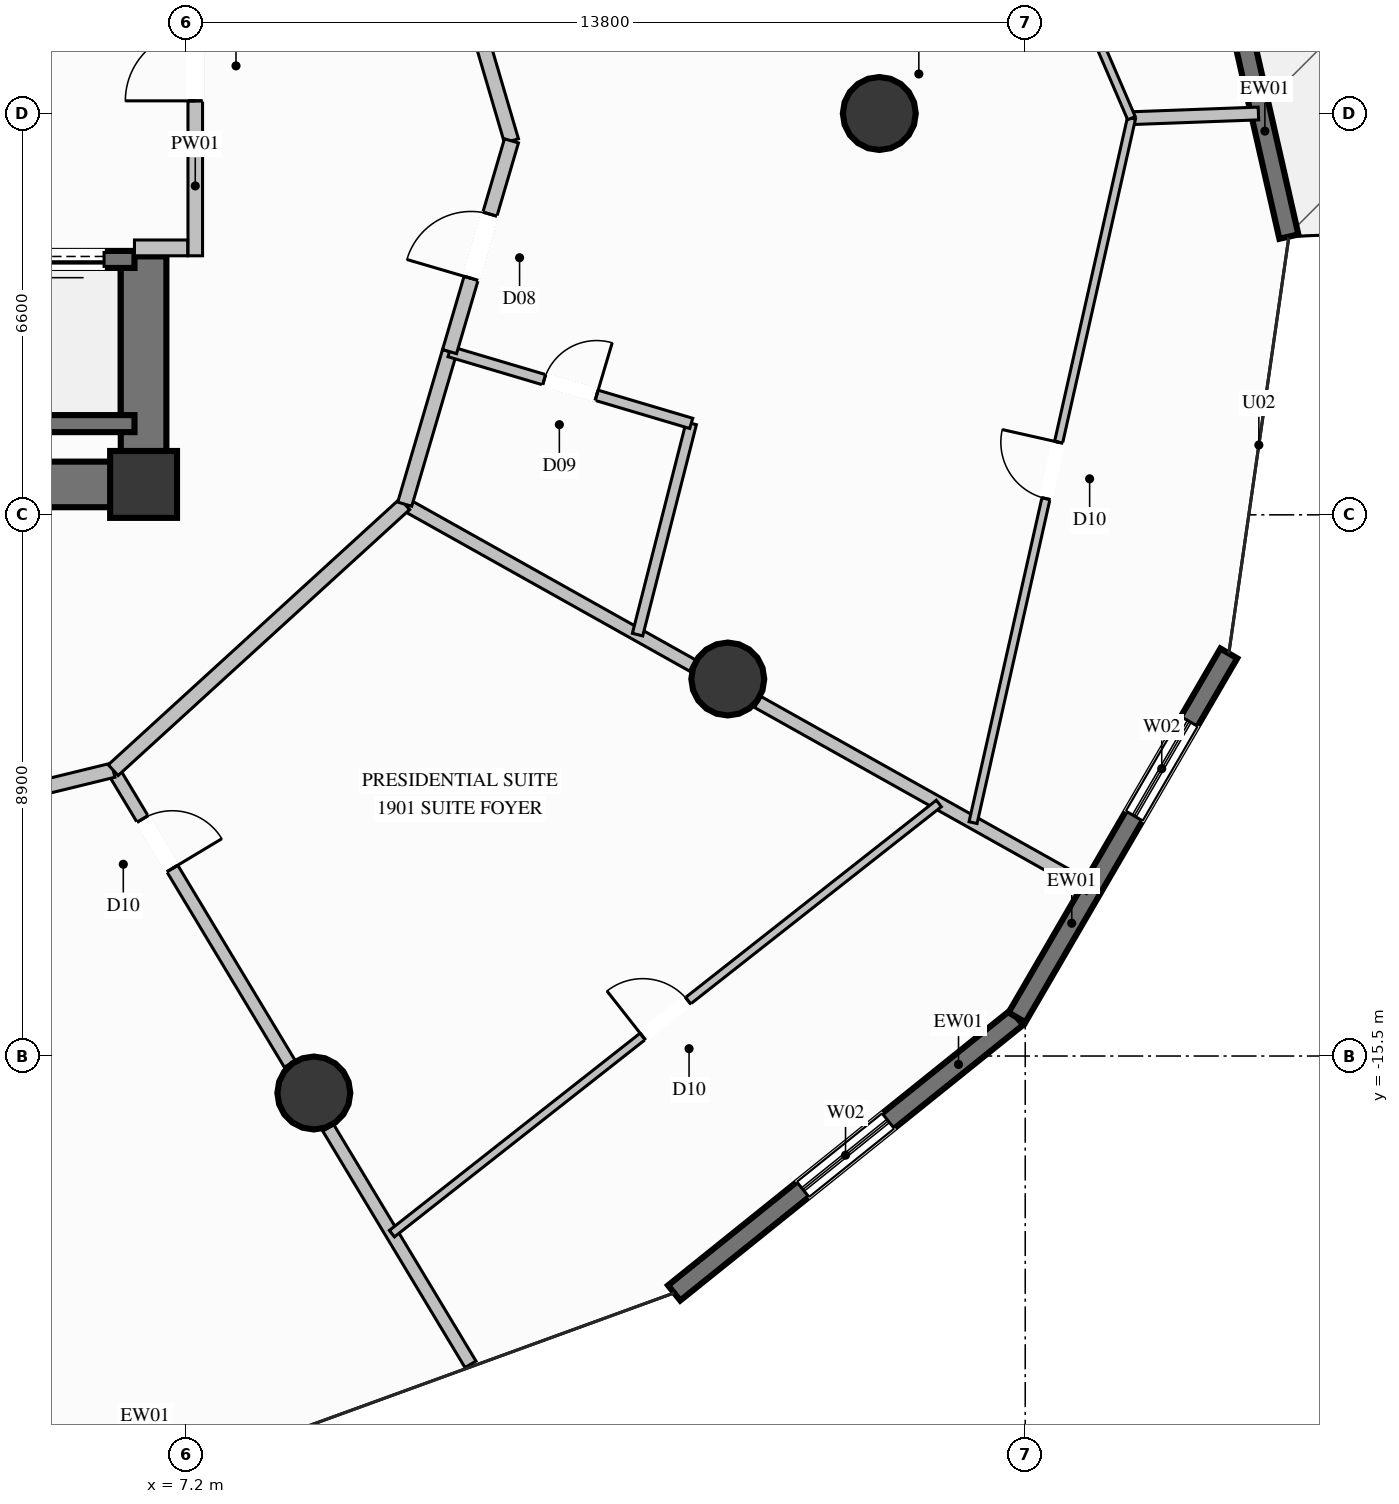
"""IFC4 building model, lengths in metres.
Left out: names, types, materials, properties, quantities, classifications, styles, units other than length and angle.
Written with IfcOpenShell. Run it as: python <this file> out.ifc"""

import sys

from ifc_helpers import new_model, si_unit, direction, frame, frame_2d, origin, origin_2d, place, context, subcontext, project, spatial, rectangle, circle, extrude, element, fill, save


model = new_model("IFC4")
c1 = context("Model", 3, precision=1e-05, world=origin(), true_north=direction((0.0, 1.0)))
c2 = subcontext(c1, "Body", "Model", "MODEL_VIEW")
j1 = project(units=[si_unit("LENGTHUNIT", "METRE"), si_unit("PLANEANGLEUNIT", "RADIAN")], contexts=[c1])
p1 = place(None, origin())
s1 = spatial("IfcSite", under=j1, at=p1, CompositionType="ELEMENT")
p2 = place(p1, origin())
s2 = spatial("IfcBuilding", under=s1, at=p2, CompositionType="ELEMENT")
p3 = place(p2, frame((0.0, 0.0, 71.6)))
s3 = spatial("IfcBuildingStorey", under=s2, at=p3, CompositionType="ELEMENT", Elevation=71.6)
p4 = place(p3, frame((6.5, -6.1, 0.0), z_axis=(0.0, 0.0, 1.0), x_axis=(1.0, 0.0, 0.0)))
e1 = element("IfcColumn", 1, at=p4, inside=s3, PredefinedType="COLUMN", context=c2, shape_type="SweptSolid", body=[
    extrude(rectangle(XDim=1.1, YDim=1.1, at=origin_2d()), origin(), (0.0, 0.0, 1.0), 3.6),
])
p5 = place(p3, frame((4.15, -6.1, 0.0), z_axis=(0.0, 0.0, 1.0), x_axis=(1.0, 0.0, 0.0)))
e2 = element("IfcWall", 2, at=p5, inside=s3, PredefinedType="SHEAR", context=c2, shape_type="SweptSolid", body=[
    extrude(rectangle(XDim=1.975, YDim=0.75, at=frame_2d((0.988, 0.0))), origin(), (0.0, 0.0, 1.0), 3.6),
])
p6 = place(p3, frame((6.5, -6.475, 0.0), z_axis=(0.0, 0.0, 1.0), x_axis=(0.0, 1.0, 0.0)))
e3 = element("IfcWall", 3, at=p6, inside=s3, PredefinedType="SHEAR", context=c2, shape_type="SweptSolid", body=[
    extrude(rectangle(XDim=4.125, YDim=0.75, at=frame_2d((2.062, 0.0))), origin(), (0.0, 0.0, 1.0), 3.6),
])
for number, where, z_axis, x_axis in (
    (4, (18.6, 0.0, 0.0), (0.0, 0.0, 1.0), (1.0, 0.0, 0.0)),
    (5, (9.3, -16.108, 0.0), (0.0, 0.0, 1.0), (1.0, 0.0, 0.0)),
    (6, (16.108, -9.3, 0.0), (0.0, 0.0, 1.0), (1.0, 0.0, 0.0)),
):
    element("IfcColumn", number, at=place(p3, frame(where, z_axis=z_axis, x_axis=x_axis)), inside=s3, PredefinedType="COLUMN", context=c2, shape_type="SweptSolid", body=[
        extrude(circle(Radius=0.6, at=origin_2d()), origin(), (0.0, 0.0, 1.0), 3.6),
    ])
p7 = place(p3, frame((23.731, 5.028, 0.0), z_axis=(0.0, 0.0, 1.0), x_axis=(0.221888063911, -0.975072144558, 0.0)))
e7 = element("IfcWall", 7, at=p7, inside=s3, PredefinedType="SOLIDWALL", context=c2, shape_type="SweptSolid", body=[
    extrude(rectangle(XDim=7.233, YDim=0.32, at=frame_2d((3.617, 0.0))), origin(), (0.0, 0.0, 1.0), 3.34),
])
p8 = place(p7, frame((1.624, 0.0, 0.35)))
e8 = element("IfcOpeningElement", 8, at=p8, cuts=e7, PredefinedType="OPENING", context=c2, shape_type="SweptSolid", body=[
    extrude(rectangle(XDim=1.8, YDim=2.6, at=frame_2d((0.9, 1.3))), frame((0.0, 0.17, 0.0), z_axis=(0.0, -1.0, 0.0), x_axis=(1.0, 0.0, 0.0)), (0.0, 0.0, 1.0), 0.34),
])
p9 = place(p3, frame((20.864, -14.865, 0.0), z_axis=(0.0, 0.0, 1.0), x_axis=(-0.779473911099, -0.626434690862, 0.0)))
e9 = element("IfcWall", 9, at=p9, inside=s3, PredefinedType="SOLIDWALL", context=c2, shape_type="SweptSolid", body=[
    extrude(rectangle(XDim=7.233, YDim=0.32, at=frame_2d((3.616, 0.0))), origin(), (0.0, 0.0, 1.0), 3.34),
])
p10 = place(p9, frame((2.717, 0.0, 0.35)))
e10 = element("IfcOpeningElement", 10, at=p10, cuts=e9, PredefinedType="OPENING", context=c2, shape_type="SweptSolid", body=[
    extrude(rectangle(XDim=1.8, YDim=2.6, at=frame_2d((0.9, 1.3))), frame((0.0, 0.17, 0.0), z_axis=(0.0, -1.0, 0.0), x_axis=(1.0, 0.0, 0.0)), (0.0, 0.0, 1.0), 0.34),
])
p11 = place(p3, frame((24.348, -8.879, 0.0), z_axis=(0.0, 0.0, 1.0), x_axis=(-0.503009446837, -0.864280912894, 0.0)))
e11 = element("IfcWall", 11, at=p11, inside=s3, PredefinedType="SOLIDWALL", context=c2, shape_type="SweptSolid", body=[
    extrude(rectangle(XDim=6.926, YDim=0.32, at=frame_2d((3.463, 0.0))), origin(), (0.0, 0.0, 1.0), 3.34),
])
p12 = place(p11, frame((1.293, 0.0, 0.35)))
e12 = element("IfcOpeningElement", 12, at=p12, cuts=e11, PredefinedType="OPENING", context=c2, shape_type="SweptSolid", body=[
    extrude(rectangle(XDim=1.8, YDim=2.6, at=frame_2d((0.9, 1.3))), frame((0.0, 0.17, 0.0), z_axis=(0.0, -1.0, 0.0), x_axis=(1.0, 0.0, 0.0)), (0.0, 0.0, 1.0), 0.34),
])
p13 = place(p3, frame((4.15, -5.1, 0.0), z_axis=(0.0, 0.0, 1.0), x_axis=(1.0, 0.0, 0.0)))
e13 = element("IfcWall", 13, at=p13, inside=s3, PredefinedType="SOLIDWALL", context=c2, shape_type="SweptSolid", body=[
    extrude(rectangle(XDim=2.2, YDim=0.28, at=frame_2d((1.1, 0.0))), origin(), (0.0, 0.0, 1.0), 3.34),
])
p14 = place(p3, frame((6.35, -2.4, 0.0), z_axis=(0.0, 0.0, 1.0), x_axis=(-1.0, 0.0, 0.0)))
e14 = element("IfcWall", 14, at=p14, inside=s3, PredefinedType="SOLIDWALL", context=c2, shape_type="SweptSolid", body=[
    extrude(rectangle(XDim=2.2, YDim=0.28, at=frame_2d((1.1, 0.0))), origin(), (0.0, 0.0, 1.0), 3.34),
])
p15 = place(p14, frame((0.5, 0.0, 0.0)))
e15 = element("IfcOpeningElement", 15, at=p15, cuts=e14, PredefinedType="OPENING", context=c2, shape_type="SweptSolid", body=[
    extrude(rectangle(XDim=1.2, YDim=2.2, at=frame_2d((0.6, 1.1))), frame((0.0, 0.15, 0.0), z_axis=(0.0, -1.0, 0.0), x_axis=(1.0, 0.0, 0.0)), (0.0, 0.0, 1.0), 0.3),
])
p16 = place(p3, frame((7.35, -2.34, 0.0), z_axis=(0.0, 0.0, 1.0), x_axis=(0.0, 1.0, 0.0)))
e16 = element("IfcWall", 16, at=p16, inside=s3, PredefinedType="PARTITIONING", context=c2, shape_type="SweptSolid", body=[
    extrude(rectangle(XDim=5.07, YDim=0.24, at=frame_2d((2.535, 0.0))), origin(), (0.0, 0.0, 1.0), 2.425),
])
p17 = place(p16, frame((2.548, 0.0, 0.0)))
e17 = element("IfcOpeningElement", 17, at=p17, cuts=e16, PredefinedType="OPENING", context=c2, shape_type="SweptSolid", body=[
    extrude(rectangle(XDim=1.15, YDim=2.2, at=frame_2d((0.575, 1.1))), frame((0.0, 0.13, 0.0), z_axis=(0.0, -1.0, 0.0), x_axis=(1.0, 0.0, 0.0)), (0.0, 0.0, 1.0), 0.26),
])
p18 = place(p3, frame((6.35, -2.21, 0.0), z_axis=(0.0, 0.0, 1.0), x_axis=(1.0, 0.0, 0.0)))
e18 = element("IfcWall", 18, at=p18, inside=s3, PredefinedType="PARTITIONING", context=c2, shape_type="SweptSolid", body=[
    extrude(rectangle(XDim=0.875, YDim=0.26, at=frame_2d((0.438, 0.0))), origin(), (0.0, 0.0, 1.0), 3.34),
])
p19 = place(p3, frame((6.0, -10.799, 0.0), z_axis=(0.0, 0.0, 1.0), x_axis=(0.515348967782, -0.856980420666, 0.0)))
e19 = element("IfcWall", 19, at=p19, inside=s3, PredefinedType="PARTITIONING", context=c2, shape_type="SweptSolid", body=[
    extrude(rectangle(XDim=5.637, YDim=0.21, at=frame_2d((2.818, 0.0))), origin(), (0.0, 0.0, 1.0), 2.709),
])
p20 = place(p19, frame((0.937, 0.0, 0.0)))
e20 = element("IfcOpeningElement", 20, at=p20, cuts=e19, PredefinedType="OPENING", context=c2, shape_type="SweptSolid", body=[
    extrude(rectangle(XDim=0.95, YDim=2.1, at=frame_2d((0.475, 1.05))), frame((0.0, 0.115, 0.0), z_axis=(0.0, -1.0, 0.0), x_axis=(1.0, 0.0, 0.0)), (0.0, 0.0, 1.0), 0.23),
])
p21 = place(p3, frame((9.537, -16.681, 0.0), z_axis=(0.0, 0.0, 1.0), x_axis=(0.515428694024, -0.856932471888, 0.0)))
e21 = element("IfcWall", 21, at=p21, inside=s3, PredefinedType="PARTITIONING", context=c2, shape_type="SweptSolid", body=[
    extrude(rectangle(XDim=4.54, YDim=0.21, at=frame_2d((2.27, 0.0))), origin(), (0.0, 0.0, 1.0), 3.34),
])
p22 = place(p3, frame((10.795, -6.425, 0.0), z_axis=(0.0, 0.0, 1.0), x_axis=(0.8723709625, -0.488844457662, 0.0)))
e22 = element("IfcWall", 22, at=p22, inside=s3, PredefinedType="PARTITIONING", context=c2, shape_type="SweptSolid", body=[
    extrude(rectangle(XDim=5.427, YDim=0.21, at=frame_2d((2.713, 0.0))), origin(), (0.0, 0.0, 1.0), 2.709),
])
p23 = place(p3, frame((16.6, -9.677, 0.0), z_axis=(0.0, 0.0, 1.0), x_axis=(0.872348901989, -0.488883823825, 0.0)))
e23 = element("IfcWall", 23, at=p23, inside=s3, PredefinedType="PARTITIONING", context=c2, shape_type="SweptSolid", body=[
    extrude(rectangle(XDim=6.255, YDim=0.21, at=frame_2d((3.128, 0.0))), origin(), (0.0, 0.0, 1.0), 3.34),
])
p24 = place(p3, frame((-0.55, -12.4, 0.0), z_axis=(0.0, 0.0, 1.0), x_axis=(0.971409027631, 0.237412091177, 0.0)))
e24 = element("IfcWall", 24, at=p24, inside=s3, PredefinedType="PARTITIONING", context=c2, shape_type="SweptSolid", body=[
    extrude(rectangle(XDim=6.743, YDim=0.24, at=frame_2d((3.372, 0.0))), origin(), (0.0, 0.0, 1.0), 2.917),
])
p25 = place(p3, frame((6.0, -10.799, 0.0), z_axis=(0.0, 0.0, 1.0), x_axis=(0.73878836807, 0.673937495028, 0.0)))
e25 = element("IfcWall", 25, at=p25, inside=s3, PredefinedType="PARTITIONING", context=c2, shape_type="SweptSolid", body=[
    extrude(rectangle(XDim=6.49, YDim=0.24, at=frame_2d((3.245, 0.0))), origin(), (0.0, 0.0, 1.0), 3.34),
])
p26 = place(p3, frame((10.584, -18.421, 0.0), z_axis=(0.0, 0.0, 1.0), x_axis=(0.78604730867, 0.618166343739, 0.0)))
e26 = element("IfcWall", 26, at=p26, inside=s3, PredefinedType="PARTITIONING", context=c2, shape_type="SweptSolid", body=[
    extrude(rectangle(XDim=11.443, YDim=0.135, at=frame_2d((5.722, 0.0))), origin(), (0.0, 0.0, 1.0), 3.34),
])
p27 = place(p26, frame((5.247, 0.0, 0.0)))
e27 = element("IfcOpeningElement", 27, at=p27, cuts=e26, PredefinedType="OPENING", context=c2, shape_type="SweptSolid", body=[
    extrude(rectangle(XDim=0.95, YDim=2.1, at=frame_2d((0.475, 1.05))), frame((0.0, 0.078, 0.0), z_axis=(0.0, -1.0, 0.0), x_axis=(1.0, 0.0, 0.0)), (0.0, 0.0, 1.0), 0.155),
])
p28 = place(p3, frame((10.795, -6.425, 0.0), z_axis=(0.0, 0.0, 1.0), x_axis=(0.281852929568, 0.959457620791, 0.0)))
e28 = element("IfcWall", 28, at=p28, inside=s3, PredefinedType="PARTITIONING", context=c2, shape_type="SweptSolid", body=[
    extrude(rectangle(XDim=2.615, YDim=0.24, at=frame_2d((1.308, 0.0))), origin(), (0.0, 0.0, 1.0), 3.34),
])
p29 = place(p3, frame((14.624, -8.57, 0.0), z_axis=(0.0, 0.0, 1.0), x_axis=(0.246347816962, 0.969181486141, 0.0)))
e29 = element("IfcWall", 29, at=p29, inside=s3, PredefinedType="PLUMBINGWALL", context=c2, shape_type="SweptSolid", body=[
    extrude(rectangle(XDim=3.584, YDim=0.175, at=frame_2d((1.792, 0.0))), origin(), (0.0, 0.0, 1.0), 3.34),
])
p30 = place(p3, frame((11.532, -3.916, 0.0), z_axis=(0.0, 0.0, 1.0), x_axis=(0.958658411313, -0.284559396995, 0.0)))
e30 = element("IfcWall", 30, at=p30, inside=s3, PredefinedType="PLUMBINGWALL", context=c2, shape_type="SweptSolid", body=[
    extrude(rectangle(XDim=4.146, YDim=0.175, at=frame_2d((2.073, 0.0))), origin(), (0.0, 0.0, 1.0), 3.34),
])
p31 = place(p30, frame((1.623, 0.0, 0.0)))
e31 = element("IfcOpeningElement", 31, at=p31, cuts=e30, PredefinedType="OPENING", context=c2, shape_type="SweptSolid", body=[
    extrude(rectangle(XDim=0.9, YDim=2.1, at=frame_2d((0.45, 1.05))), frame((0.0, 0.098, 0.0), z_axis=(0.0, -1.0, 0.0), x_axis=(1.0, 0.0, 0.0)), (0.0, 0.0, 1.0), 0.195),
])
p32 = place(p3, frame((22.747, -0.077, 0.0), z_axis=(0.0, 0.0, 1.0), x_axis=(0.9993223365, 0.036808528531, 0.0)))
e32 = element("IfcWall", 32, at=p32, inside=s3, PredefinedType="PARTITIONING", context=c2, shape_type="SweptSolid", body=[
    extrude(rectangle(XDim=2.089, YDim=0.21, at=frame_2d((1.045, 0.0))), origin(), (0.0, 0.0, 1.0), 3.34),
])
p33 = place(p3, frame((12.55, -0.45, 0.0), z_axis=(0.0, 0.0, 1.0), x_axis=(-0.281843679574, 0.959460338046, 0.0)))
e33 = element("IfcWall", 33, at=p33, inside=s3, PredefinedType="PARTITIONING", context=c2, shape_type="SweptSolid", body=[
    extrude(rectangle(XDim=6.227, YDim=0.24, at=frame_2d((3.114, 0.0))), origin(), (0.0, 0.0, 1.0), 2.917),
])
p34 = place(p3, frame((11.532, -3.916, 0.0), z_axis=(0.0, 0.0, 1.0), x_axis=(0.281818707972, 0.959467673159, 0.0)))
e34 = element("IfcWall", 34, at=p34, inside=s3, PredefinedType="PARTITIONING", context=c2, shape_type="SweptSolid", body=[
    extrude(rectangle(XDim=3.613, YDim=0.24, at=frame_2d((1.806, 0.0))), origin(), (0.0, 0.0, 1.0), 2.917),
])
p35 = place(p34, frame((1.256, 0.0, 0.0)))
e35 = element("IfcOpeningElement", 35, at=p35, cuts=e34, PredefinedType="OPENING", context=c2, shape_type="SweptSolid", body=[
    extrude(rectangle(XDim=1.1, YDim=2.3, at=frame_2d((0.55, 1.15))), frame((0.0, 0.13, 0.0), z_axis=(0.0, -1.0, 0.0), x_axis=(1.0, 0.0, 0.0)), (0.0, 0.0, 1.0), 0.26),
])
p36 = place(p3, frame((20.142, -11.662, 0.0), z_axis=(0.0, 0.0, 1.0), x_axis=(0.219376674663, 0.975640238312, 0.0)))
e36 = element("IfcWall", 36, at=p36, inside=s3, PredefinedType="PARTITIONING", context=c2, shape_type="SweptSolid", body=[
    extrude(rectangle(XDim=11.875, YDim=0.135, at=frame_2d((5.937, 0.0))), origin(), (0.0, 0.0, 1.0), 3.34),
])
p37 = place(p36, frame((5.462, 0.0, 0.0)))
e37 = element("IfcOpeningElement", 37, at=p37, cuts=e36, PredefinedType="OPENING", context=c2, shape_type="SweptSolid", body=[
    extrude(rectangle(XDim=0.95, YDim=2.1, at=frame_2d((0.475, 1.05))), frame((0.0, 0.078, 0.0), z_axis=(0.0, -1.0, 0.0), x_axis=(1.0, 0.0, 0.0)), (0.0, 0.0, 1.0), 0.155),
])
p38 = place(p3, frame((22.747, -0.077, 0.0), z_axis=(0.0, 0.0, 1.0), x_axis=(-0.395508976522, 0.918462111081, 0.0)))
e38 = element("IfcWall", 38, at=p38, inside=s3, PredefinedType="PARTITIONING", context=c2, shape_type="SweptSolid", body=[
    extrude(rectangle(XDim=11.414, YDim=0.135, at=frame_2d((5.707, 0.0))), origin(), (0.0, 0.0, 1.0), 3.34),
])
p39 = place(p38, frame((5.232, 0.0, 0.0)))
e39 = element("IfcOpeningElement", 39, at=p39, cuts=e38, PredefinedType="OPENING", context=c2, shape_type="SweptSolid", body=[
    extrude(rectangle(XDim=0.95, YDim=2.1, at=frame_2d((0.475, 1.05))), frame((0.0, 0.078, 0.0), z_axis=(0.0, -1.0, 0.0), x_axis=(1.0, 0.0, 0.0)), (0.0, 0.0, 1.0), 0.155),
])
p40 = place(p10, origin())
e40 = element("IfcWindow", 40, at=p40, inside=s3, PartitioningType="SINGLE_PANEL", PredefinedType="WINDOW", context=c2, shape_type="SweptSolid", body=[
    extrude(rectangle(XDim=1.8, YDim=2.6, at=frame_2d((0.9, 1.3))), frame((0.0, 0.03, 0.0), z_axis=(0.0, -1.0, 0.0), x_axis=(1.0, 0.0, 0.0)), (0.0, 0.0, 1.0), 0.06),
])
fill(e10, e40)
p41 = place(p12, origin())
e41 = element("IfcWindow", 41, at=p41, inside=s3, PartitioningType="SINGLE_PANEL", PredefinedType="WINDOW", context=c2, shape_type="SweptSolid", body=[
    extrude(rectangle(XDim=1.8, YDim=2.6, at=frame_2d((0.9, 1.3))), frame((0.0, 0.03, 0.0), z_axis=(0.0, -1.0, 0.0), x_axis=(1.0, 0.0, 0.0)), (0.0, 0.0, 1.0), 0.06),
])
fill(e12, e41)
p42 = place(p15, origin())
e42 = element("IfcDoor", 42, at=p42, inside=s3, OperationType="SLIDING_TO_LEFT", PredefinedType="DOOR", context=c2, shape_type="SweptSolid", body=[
    extrude(rectangle(XDim=1.2, YDim=2.2, at=frame_2d((0.6, 1.1))), frame((0.0, 0.025, 0.0), z_axis=(0.0, -1.0, 0.0), x_axis=(1.0, 0.0, 0.0)), (0.0, 0.0, 1.0), 0.05),
])
fill(e15, e42)
p43 = place(p17, origin())
e43 = element("IfcDoor", 43, at=p43, inside=s3, OperationType="SINGLE_SWING_LEFT", PredefinedType="DOOR", context=c2, shape_type="SweptSolid", body=[
    extrude(rectangle(XDim=1.15, YDim=2.2, at=frame_2d((0.575, 1.1))), frame((0.0, 0.025, 0.0), z_axis=(0.0, -1.0, 0.0), x_axis=(1.0, 0.0, 0.0)), (0.0, 0.0, 1.0), 0.05),
])
fill(e17, e43)
p44 = place(p20, origin())
e44 = element("IfcDoor", 44, at=p44, inside=s3, OperationType="SINGLE_SWING_RIGHT", PredefinedType="DOOR", context=c2, shape_type="SweptSolid", body=[
    extrude(rectangle(XDim=0.95, YDim=2.1, at=frame_2d((0.475, 1.05))), frame((0.0, 0.025, 0.0), z_axis=(0.0, -1.0, 0.0), x_axis=(1.0, 0.0, 0.0)), (0.0, 0.0, 1.0), 0.05),
])
fill(e20, e44)
p45 = place(p27, origin())
e45 = element("IfcDoor", 45, at=p45, inside=s3, OperationType="SINGLE_SWING_LEFT", PredefinedType="DOOR", context=c2, shape_type="SweptSolid", body=[
    extrude(rectangle(XDim=0.95, YDim=2.1, at=frame_2d((0.475, 1.05))), frame((0.0, 0.025, 0.0), z_axis=(0.0, -1.0, 0.0), x_axis=(1.0, 0.0, 0.0)), (0.0, 0.0, 1.0), 0.05),
])
fill(e27, e45)
p46 = place(p31, origin())
e46 = element("IfcDoor", 46, at=p46, inside=s3, OperationType="SINGLE_SWING_RIGHT", PredefinedType="DOOR", context=c2, shape_type="SweptSolid", body=[
    extrude(rectangle(XDim=0.9, YDim=2.1, at=frame_2d((0.45, 1.05))), frame((0.0, 0.025, 0.0), z_axis=(0.0, -1.0, 0.0), x_axis=(1.0, 0.0, 0.0)), (0.0, 0.0, 1.0), 0.05),
])
fill(e31, e46)
p47 = place(p35, origin())
e47 = element("IfcDoor", 47, at=p47, inside=s3, OperationType="SINGLE_SWING_LEFT", PredefinedType="DOOR", context=c2, shape_type="SweptSolid", body=[
    extrude(rectangle(XDim=1.1, YDim=2.3, at=frame_2d((0.55, 1.15))), frame((0.0, 0.025, 0.0), z_axis=(0.0, -1.0, 0.0), x_axis=(1.0, 0.0, 0.0)), (0.0, 0.0, 1.0), 0.05),
])
fill(e35, e47)
p48 = place(p37, origin())
e48 = element("IfcDoor", 48, at=p48, inside=s3, OperationType="SINGLE_SWING_RIGHT", PredefinedType="DOOR", context=c2, shape_type="SweptSolid", body=[
    extrude(rectangle(XDim=0.95, YDim=2.1, at=frame_2d((0.475, 1.05))), frame((0.0, 0.025, 0.0), z_axis=(0.0, -1.0, 0.0), x_axis=(1.0, 0.0, 0.0)), (0.0, 0.0, 1.0), 0.05),
])
fill(e37, e48)
save(model, sys.argv[1])
